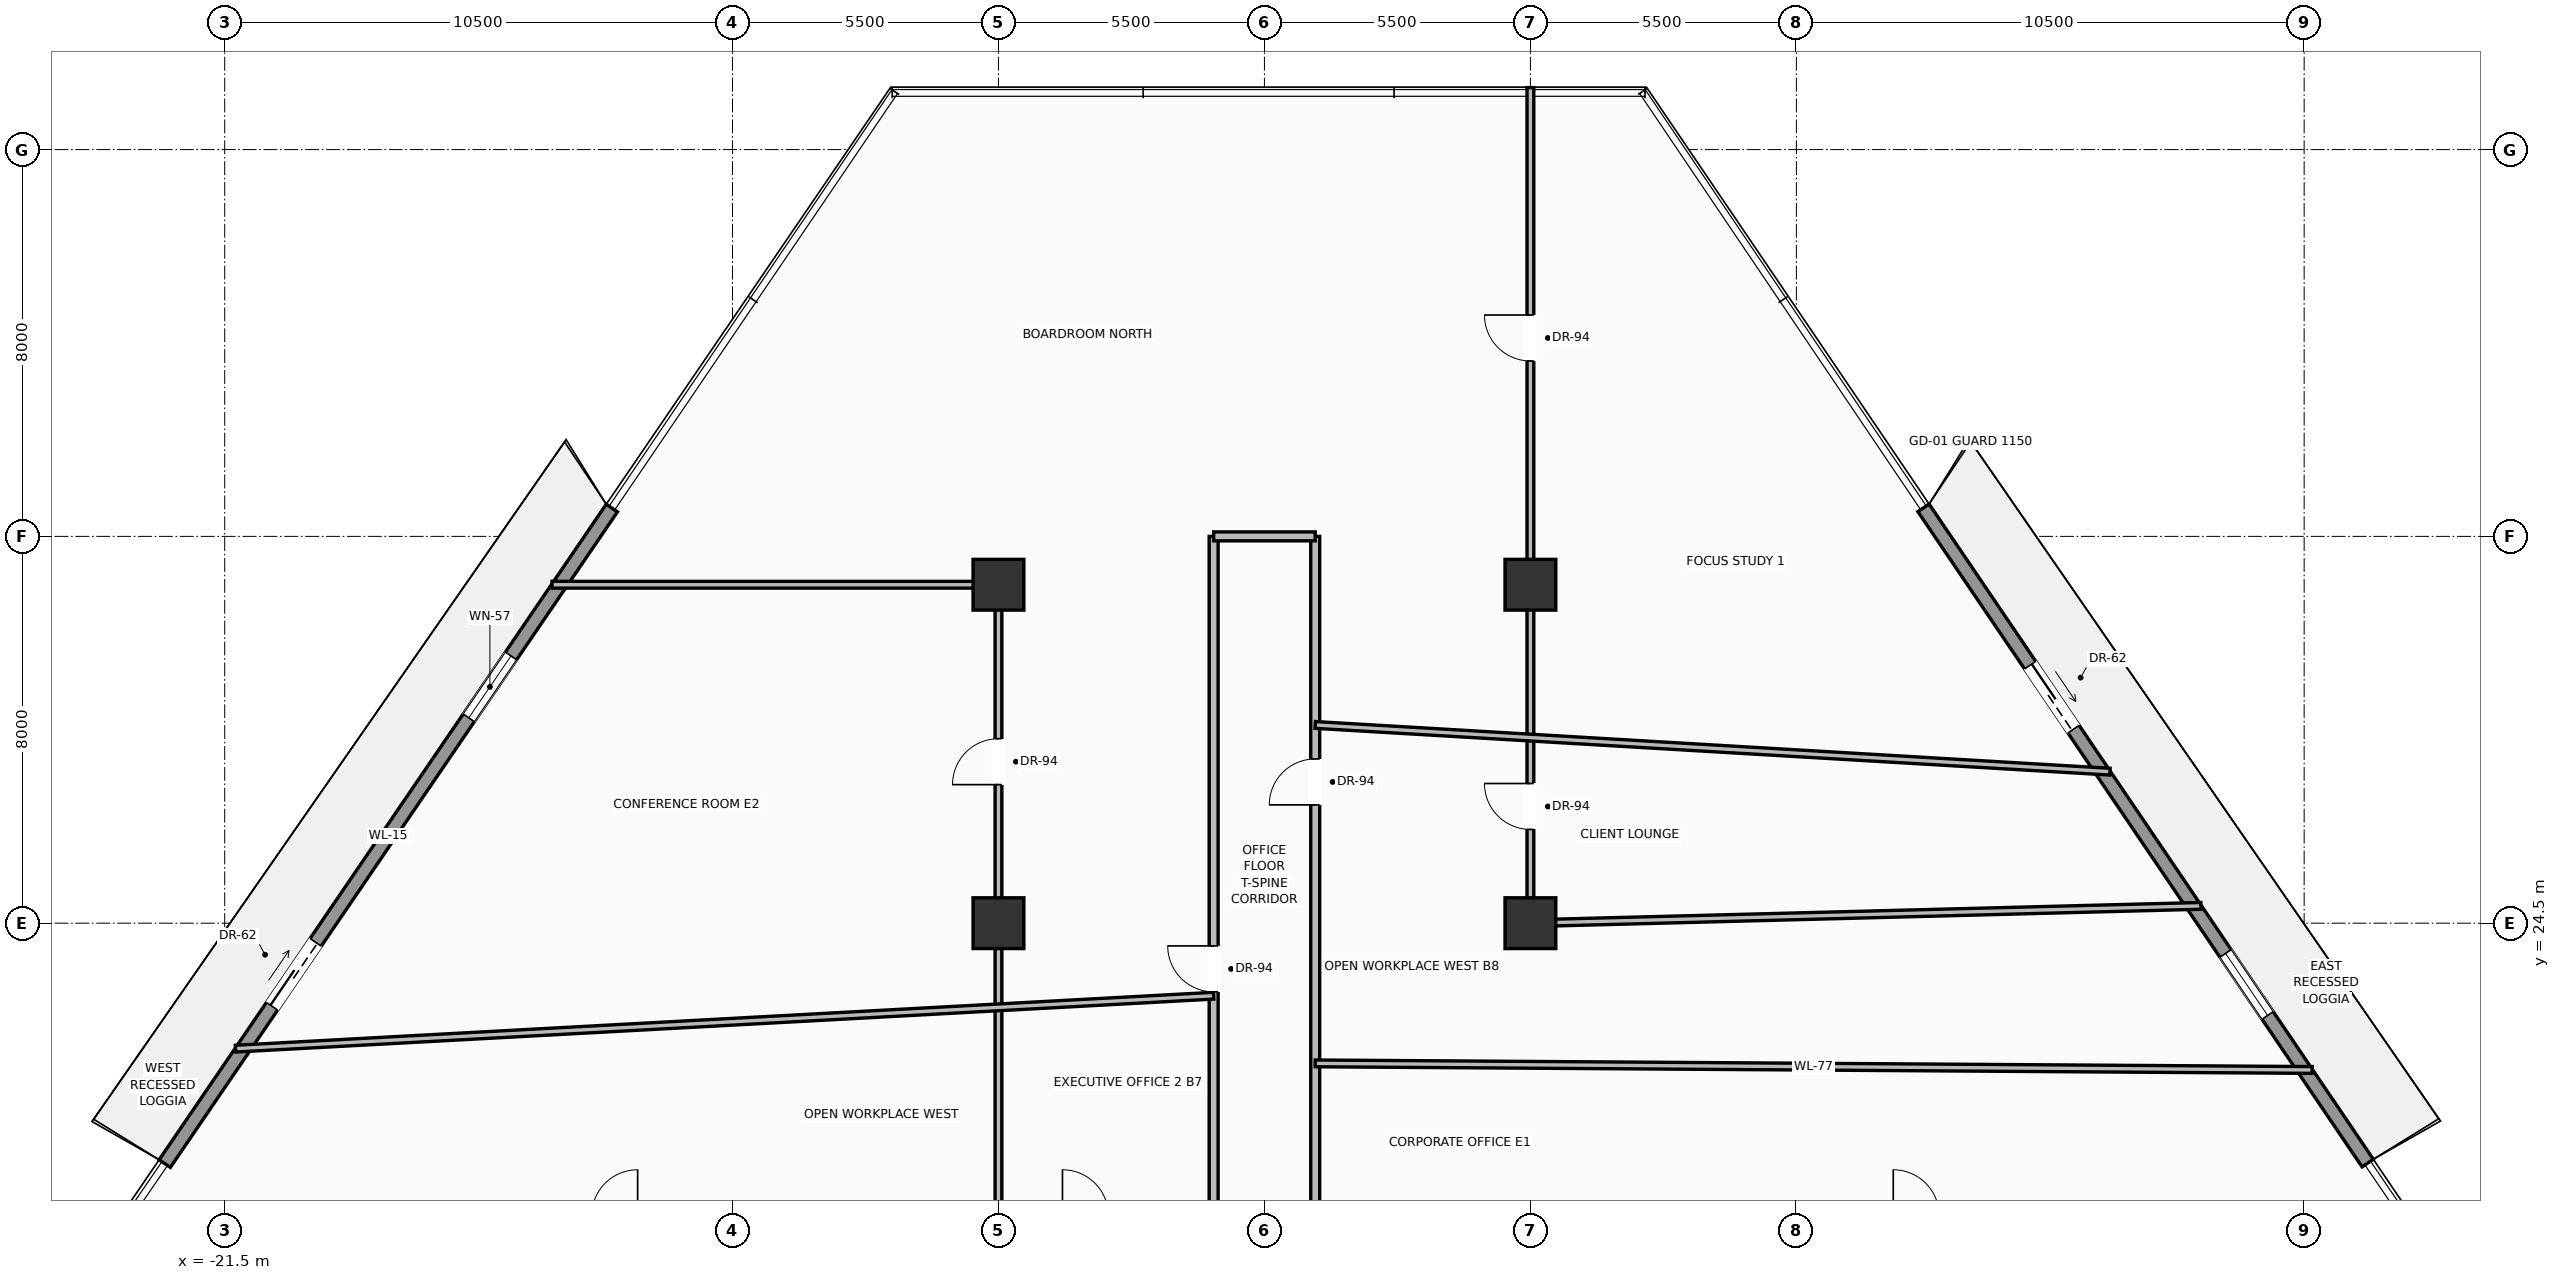
"""IFC4 building model, lengths in metres.
Left out: names, types, materials, properties, quantities, classifications, styles, units other than length and angle.
Written with IfcOpenShell. Run it as: python <this file> out.ifc"""

import sys

from ifc_helpers import new_model, si_unit, direction, frame, frame_2d, origin, origin_2d, place, context, subcontext, project, spatial, rectangle, extrude, source, transform, mapped, element, fill, save


model = new_model("IFC4")
c1 = context("Model", 3, precision=1e-05, world=origin(), true_north=direction((0.0, 1.0)))
c2 = subcontext(c1, "Body", "Model", "MODEL_VIEW")
j1 = project(units=[si_unit("LENGTHUNIT", "METRE"), si_unit("PLANEANGLEUNIT", "RADIAN")], contexts=[c1])
p1 = place(None, origin())
s1 = spatial("IfcSite", under=j1, at=p1, CompositionType="ELEMENT")
p2 = place(p1, origin())
s2 = spatial("IfcBuilding", under=s1, at=p2, CompositionType="ELEMENT")
p3 = place(p2, frame((0.0, 0.0, 34.9)))
s3 = spatial("IfcBuildingStorey", under=s2, at=p3, CompositionType="ELEMENT", Elevation=34.9)
m1 = source(origin(), c2, "Body", "SweptSolid", [
    extrude(rectangle(XDim=1.05, YDim=1.05, at=origin_2d()), origin(), (0.0, 0.0, 1.0), 3.7),
])
for number, where, z_axis, x_axis in (
    (1, (-5.5, 24.5, 0.0), (0.0, 0.0, 1.0), (1.0, 0.0, 0.0)),
    (2, (5.5, 24.5, 0.0), (0.0, 0.0, 1.0), (1.0, 0.0, 0.0)),
    (3, (-5.5, 31.5, 0.0), (0.0, 0.0, 1.0), (1.0, 0.0, 0.0)),
    (4, (5.5, 31.5, 0.0), (0.0, 0.0, 1.0), (1.0, 0.0, 0.0)),
):
    element("IfcColumn", number, at=place(p3, frame(where, z_axis=z_axis, x_axis=x_axis)), inside=s3, PredefinedType="COLUMN", context=c2, shape_type="MappedRepresentation", body=[
        mapped(m1, transform((0.0, 0.0, 0.0), scale=1.0)),
    ])
p4 = place(p3, frame((-22.74, 19.528, 0.0), z_axis=(0.0, 0.0, 1.0), x_axis=(0.563410685264, 0.826176978455, 0.0)))
e5 = element("IfcWall", 5, at=p4, inside=s3, PredefinedType="SOLIDWALL", context=c2, shape_type="SweptSolid", body=[
    extrude(rectangle(XDim=16.41, YDim=0.28, at=frame_2d((8.205, 0.0))), origin(), (0.0, 0.0, 1.0), 3.03),
])
p5 = place(p4, frame((3.938, 0.0, 0.0)))
e6 = element("IfcOpeningElement", 6, at=p5, cuts=e5, PredefinedType="OPENING", context=c2, shape_type="SweptSolid", body=[
    extrude(rectangle(XDim=1.6, YDim=2.35, at=frame_2d((0.8, 1.175))), frame((0.0, 0.15, 0.0), z_axis=(0.0, -1.0, 0.0), x_axis=(1.0, 0.0, 0.0)), (0.0, 0.0, 1.0), 0.3),
])
p6 = place(p4, frame((11.159, 0.0, 0.9)))
e7 = element("IfcOpeningElement", 7, at=p6, cuts=e5, PredefinedType="OPENING", context=c2, shape_type="SweptSolid", body=[
    extrude(rectangle(XDim=1.55, YDim=1.85, at=frame_2d((0.775, 0.925))), frame((0.0, 0.15, 0.0), z_axis=(0.0, -1.0, 0.0), x_axis=(1.0, 0.0, 0.0)), (0.0, 0.0, 1.0), 0.3),
])
p7 = place(p3, frame((13.629, 33.09, 0.0), z_axis=(0.0, 0.0, 1.0), x_axis=(0.56106773426, -0.827769894096, 0.0)))
e8 = element("IfcWall", 8, at=p7, inside=s3, PredefinedType="SOLIDWALL", context=c2, shape_type="SweptSolid", body=[
    extrude(rectangle(XDim=16.371, YDim=0.28, at=frame_2d((8.186, 0.0))), origin(), (0.0, 0.0, 1.0), 3.03),
])
p8 = place(p7, frame((3.929, 0.0, 0.0)))
e9 = element("IfcOpeningElement", 9, at=p8, cuts=e8, PredefinedType="OPENING", context=c2, shape_type="SweptSolid", body=[
    extrude(rectangle(XDim=1.6, YDim=2.35, at=frame_2d((0.8, 1.175))), frame((0.0, 0.15, 0.0), z_axis=(0.0, -1.0, 0.0), x_axis=(1.0, 0.0, 0.0)), (0.0, 0.0, 1.0), 0.3),
])
p9 = place(p7, frame((11.132, 0.0, 0.9)))
e10 = element("IfcOpeningElement", 10, at=p9, cuts=e8, PredefinedType="OPENING", context=c2, shape_type="SweptSolid", body=[
    extrude(rectangle(XDim=1.55, YDim=1.85, at=frame_2d((0.775, 0.925))), frame((0.0, 0.15, 0.0), z_axis=(0.0, -1.0, 0.0), x_axis=(1.0, 0.0, 0.0)), (0.0, 0.0, 1.0), 0.3),
])
p10 = place(p3, frame((-1.05, 18.45, 0.0), z_axis=(0.0, 0.0, 1.0), x_axis=(0.0, 1.0, 0.0)))
e11 = element("IfcWall", 11, at=p10, inside=s3, PredefinedType="PARTITIONING", context=c2, shape_type="SweptSolid", body=[
    extrude(rectangle(XDim=14.05, YDim=0.185, at=frame_2d((7.025, 0.0))), origin(), (0.0, 0.0, 1.0), 2.747),
])
p11 = place(p10, frame((4.63, 0.0, 0.0)))
e12 = element("IfcOpeningElement", 12, at=p11, cuts=e11, PredefinedType="OPENING", context=c2, shape_type="SweptSolid", body=[
    extrude(rectangle(XDim=0.95, YDim=2.2, at=frame_2d((0.475, 1.1))), frame((0.0, 0.103, 0.0), z_axis=(0.0, -1.0, 0.0), x_axis=(1.0, 0.0, 0.0)), (0.0, 0.0, 1.0), 0.205),
])
p12 = place(p3, frame((1.05, 18.45, 0.0), z_axis=(0.0, 0.0, 1.0), x_axis=(0.0, 1.0, 0.0)))
e13 = element("IfcWall", 13, at=p12, inside=s3, PredefinedType="PARTITIONING", context=c2, shape_type="SweptSolid", body=[
    extrude(rectangle(XDim=14.05, YDim=0.185, at=frame_2d((7.025, 0.0))), origin(), (0.0, 0.0, 1.0), 2.747),
])
p13 = place(p12, frame((8.496, 0.0, 0.0)))
e14 = element("IfcOpeningElement", 14, at=p13, cuts=e13, PredefinedType="OPENING", context=c2, shape_type="SweptSolid", body=[
    extrude(rectangle(XDim=0.95, YDim=2.2, at=frame_2d((0.475, 1.1))), frame((0.0, 0.103, 0.0), z_axis=(0.0, -1.0, 0.0), x_axis=(1.0, 0.0, 0.0)), (0.0, 0.0, 1.0), 0.205),
])
p14 = place(p3, frame((-1.05, 32.5, 0.0), z_axis=(0.0, 0.0, 1.0), x_axis=(1.0, 0.0, 0.0)))
e15 = element("IfcWall", 15, at=p14, inside=s3, PredefinedType="PARTITIONING", context=c2, shape_type="SweptSolid", body=[
    extrude(rectangle(XDim=2.1, YDim=0.185, at=frame_2d((1.05, 0.0))), origin(), (0.0, 0.0, 1.0), 3.442),
])
p15 = place(p3, frame((-5.5, 18.3, 0.0), z_axis=(0.0, 0.0, 1.0), x_axis=(0.0, 1.0, 0.0)))
e16 = element("IfcWall", 16, at=p15, inside=s3, PredefinedType="PARTITIONING", context=c2, shape_type="SweptSolid", body=[
    extrude(rectangle(XDim=13.2, YDim=0.14, at=frame_2d((6.6, 0.0))), origin(), (0.0, 0.0, 1.0), 2.747),
])
p16 = place(p15, frame((9.065, 0.0, 0.0)))
e17 = element("IfcOpeningElement", 17, at=p16, cuts=e16, PredefinedType="OPENING", context=c2, shape_type="SweptSolid", body=[
    extrude(rectangle(XDim=0.95, YDim=2.2, at=frame_2d((0.475, 1.1))), frame((0.0, 0.08, 0.0), z_axis=(0.0, -1.0, 0.0), x_axis=(1.0, 0.0, 0.0)), (0.0, 0.0, 1.0), 0.16),
])
p17 = place(p3, frame((5.5, 24.5, 0.0), z_axis=(0.0, 0.0, 1.0), x_axis=(0.0, 1.0, 0.0)))
e18 = element("IfcWall", 18, at=p17, inside=s3, PredefinedType="PARTITIONING", context=c2, shape_type="SweptSolid", body=[
    extrude(rectangle(XDim=17.282, YDim=0.14, at=frame_2d((8.641, 0.0))), origin(), (0.0, 0.0, 1.0), 2.747),
])
p18 = place(p17, frame((1.939, 0.0, 0.0)))
e19 = element("IfcOpeningElement", 19, at=p18, cuts=e18, PredefinedType="OPENING", context=c2, shape_type="SweptSolid", body=[
    extrude(rectangle(XDim=0.95, YDim=2.2, at=frame_2d((0.475, 1.1))), frame((0.0, 0.08, 0.0), z_axis=(0.0, -1.0, 0.0), x_axis=(1.0, 0.0, 0.0)), (0.0, 0.0, 1.0), 0.16),
])
p19 = place(p17, frame((11.628, 0.0, 0.0)))
e20 = element("IfcOpeningElement", 20, at=p19, cuts=e18, PredefinedType="OPENING", context=c2, shape_type="SweptSolid", body=[
    extrude(rectangle(XDim=0.95, YDim=2.2, at=frame_2d((0.475, 1.1))), frame((0.0, 0.08, 0.0), z_axis=(0.0, -1.0, 0.0), x_axis=(1.0, 0.0, 0.0)), (0.0, 0.0, 1.0), 0.16),
])
p20 = place(p3, frame((-14.733, 31.5, 0.0), z_axis=(0.0, 0.0, 1.0), x_axis=(1.0, 0.0, 0.0)))
e21 = element("IfcWall", 21, at=p20, inside=s3, PredefinedType="PARTITIONING", context=c2, shape_type="SweptSolid", body=[
    extrude(rectangle(XDim=9.233, YDim=0.14, at=frame_2d((4.616, 0.0))), origin(), (0.0, 0.0, 1.0), 2.747),
])
p21 = place(p3, frame((5.5, 24.5, 0.0), z_axis=(0.0, 0.0, 1.0), x_axis=(0.999666998151, 0.025804898917, 0.0)))
e22 = element("IfcWall", 22, at=p21, inside=s3, PredefinedType="PARTITIONING", context=c2, shape_type="SweptSolid", body=[
    extrude(rectangle(XDim=13.87, YDim=0.14, at=frame_2d((6.935, 0.0))), origin(), (0.0, 0.0, 1.0), 2.747),
])
p22 = place(p3, frame((-21.276, 21.905, 0.0), z_axis=(0.0, 0.0, 1.0), x_axis=(0.998537212519, 0.054068800745, 0.0)))
e23 = element("IfcWall", 23, at=p22, inside=s3, PredefinedType="PARTITIONING", context=c2, shape_type="SweptSolid", body=[
    extrude(rectangle(XDim=20.256, YDim=0.14, at=frame_2d((10.128, 0.0))), origin(), (0.0, 0.0, 1.0), 2.747),
])
p23 = place(p3, frame((1.05, 21.6, 0.0), z_axis=(0.0, 0.0, 1.0), x_axis=(0.999978245495, -0.006596100077, 0.0)))
e24 = element("IfcWall", 24, at=p23, inside=s3, PredefinedType="PARTITIONING", context=c2, shape_type="SweptSolid", body=[
    extrude(rectangle(XDim=20.616, YDim=0.14, at=frame_2d((10.308, 0.0))), origin(), (0.0, 0.0, 1.0), 2.747),
])
p24 = place(p3, frame((1.05, 28.6, 0.0), z_axis=(0.0, 0.0, 1.0), x_axis=(0.998275753656, -0.058698549061, 0.0)))
e25 = element("IfcWall", 25, at=p24, inside=s3, PredefinedType="PARTITIONING", context=c2, shape_type="SweptSolid", body=[
    extrude(rectangle(XDim=16.462, YDim=0.14, at=frame_2d((8.231, 0.0))), origin(), (0.0, 0.0, 1.0), 2.747),
])
m2 = source(origin(), c2, "Body", "SweptSolid", [
    extrude(rectangle(XDim=1.6, YDim=2.35, at=frame_2d((0.8, 1.175))), frame((0.0, 0.025, 0.0), z_axis=(0.0, -1.0, 0.0), x_axis=(1.0, 0.0, 0.0)), (0.0, 0.0, 1.0), 0.05),
])
p25 = place(p5, origin())
e26 = element("IfcDoor", 26, at=p25, inside=s3, OperationType="SLIDING_TO_LEFT", PredefinedType="DOOR", context=c2, shape_type="MappedRepresentation", body=[
    mapped(m2, transform((0.0, 0.0, 0.0), scale=1.0)),
])
fill(e6, e26)
m3 = source(origin(), c2, "Body", "SweptSolid", [
    extrude(rectangle(XDim=1.55, YDim=1.85, at=frame_2d((0.775, 0.925))), frame((0.0, 0.03, 0.0), z_axis=(0.0, -1.0, 0.0), x_axis=(1.0, 0.0, 0.0)), (0.0, 0.0, 1.0), 0.06),
])
p26 = place(p6, origin())
e27 = element("IfcWindow", 27, at=p26, inside=s3, PartitioningType="SINGLE_PANEL", PredefinedType="WINDOW", context=c2, shape_type="MappedRepresentation", body=[
    mapped(m3, transform((0.0, 0.0, 0.0), scale=1.0)),
])
fill(e7, e27)
p27 = place(p8, origin())
e28 = element("IfcDoor", 28, at=p27, inside=s3, OperationType="SLIDING_TO_RIGHT", PredefinedType="DOOR", context=c2, shape_type="MappedRepresentation", body=[
    mapped(m2, transform((0.0, 0.0, 0.0), scale=1.0)),
])
fill(e9, e28)
p28 = place(p9, origin())
e29 = element("IfcWindow", 29, at=p28, inside=s3, PartitioningType="SINGLE_PANEL", PredefinedType="WINDOW", context=c2, shape_type="MappedRepresentation", body=[
    mapped(m3, transform((0.0, 0.0, 0.0), scale=1.0)),
])
fill(e10, e29)
m4 = source(origin(), c2, "Body", "SweptSolid", [
    extrude(rectangle(XDim=0.95, YDim=2.2, at=frame_2d((0.475, 1.1))), frame((0.0, 0.025, 0.0), z_axis=(0.0, -1.0, 0.0), x_axis=(1.0, 0.0, 0.0)), (0.0, 0.0, 1.0), 0.05),
])
p29 = place(p11, origin())
e30 = element("IfcDoor", 30, at=p29, inside=s3, OperationType="SINGLE_SWING_RIGHT", PredefinedType="DOOR", context=c2, shape_type="MappedRepresentation", body=[
    mapped(m4, transform((0.0, 0.0, 0.0), scale=1.0)),
])
fill(e12, e30)
p30 = place(p13, origin())
e31 = element("IfcDoor", 31, at=p30, inside=s3, OperationType="SINGLE_SWING_LEFT", PredefinedType="DOOR", context=c2, shape_type="MappedRepresentation", body=[
    mapped(m4, transform((0.0, 0.0, 0.0), scale=1.0)),
])
fill(e14, e31)
p31 = place(p18, origin())
e32 = element("IfcDoor", 32, at=p31, inside=s3, OperationType="SINGLE_SWING_RIGHT", PredefinedType="DOOR", context=c2, shape_type="MappedRepresentation", body=[
    mapped(m4, transform((0.0, 0.0, 0.0), scale=1.0)),
])
fill(e19, e32)
p32 = place(p16, origin())
e33 = element("IfcDoor", 33, at=p32, inside=s3, OperationType="SINGLE_SWING_LEFT", PredefinedType="DOOR", context=c2, shape_type="MappedRepresentation", body=[
    mapped(m4, transform((0.0, 0.0, 0.0), scale=1.0)),
])
fill(e17, e33)
p33 = place(p19, origin())
e34 = element("IfcDoor", 34, at=p33, inside=s3, OperationType="SINGLE_SWING_RIGHT", PredefinedType="DOOR", context=c2, shape_type="MappedRepresentation", body=[
    mapped(m4, transform((0.0, 0.0, 0.0), scale=1.0)),
])
fill(e20, e34)
save(model, sys.argv[1])
